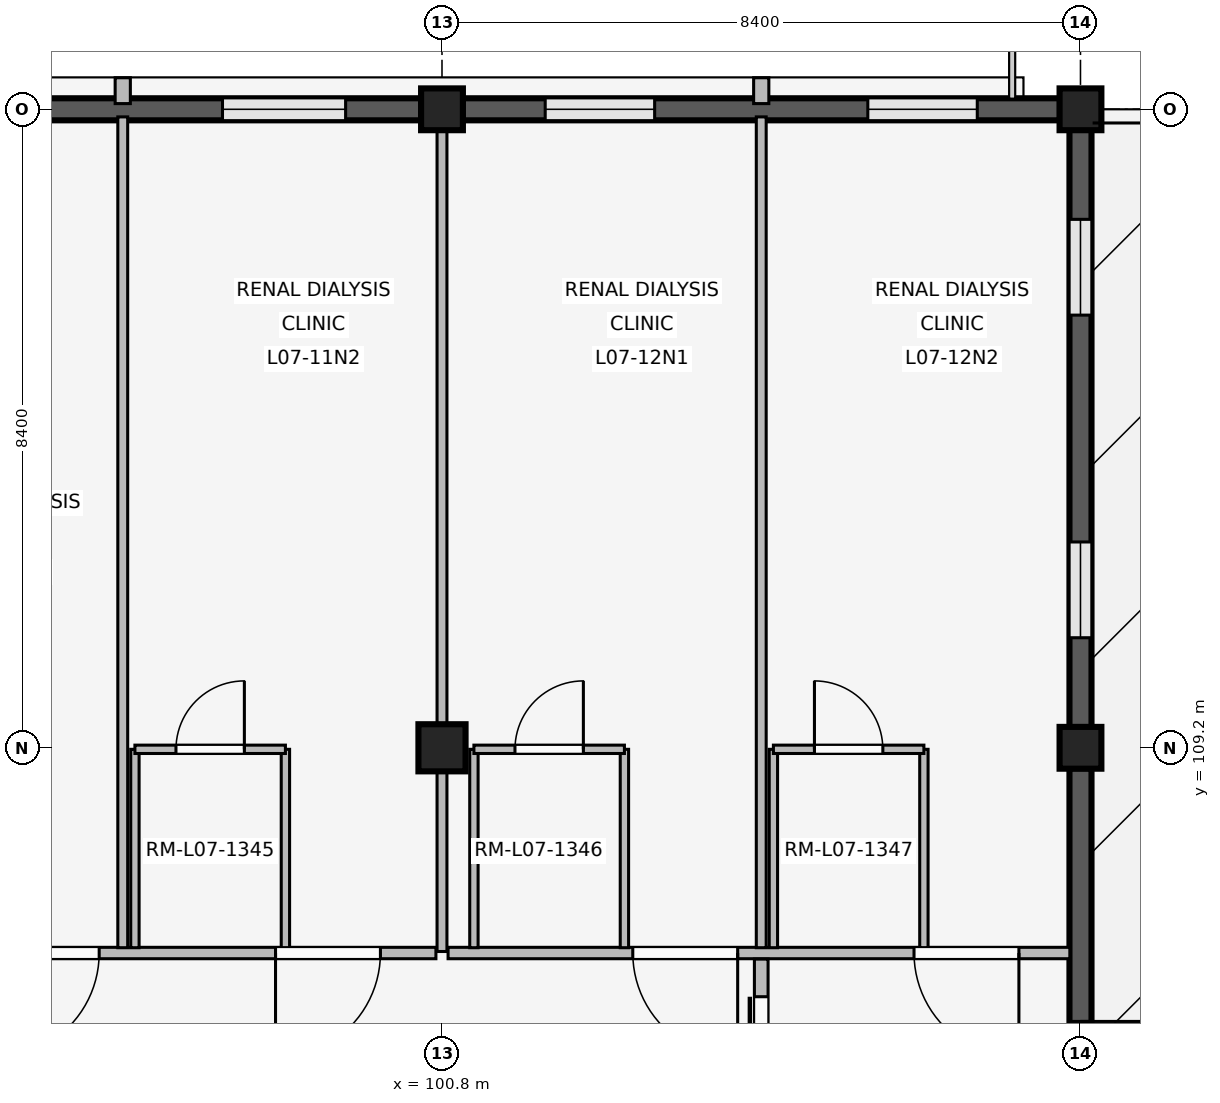
"""IFC4 building model, lengths in metres.
Left out: names, types, materials, properties, quantities, classifications, styles, units other than length and angle.
Written with IfcOpenShell. Run it as: python <this file> out.ifc"""

import sys

from ifc_helpers import new_model, si_unit, direction, frame, frame_2d, origin, origin_2d, place, context, subcontext, project, spatial, rectangle, extrude, element, fill, save


model = new_model("IFC4")
c1 = context("Model", 3, precision=1e-05, world=origin(), true_north=direction((0.0, 1.0)))
c2 = subcontext(c1, "Body", "Model", "MODEL_VIEW")
j1 = project(units=[si_unit("LENGTHUNIT", "METRE"), si_unit("PLANEANGLEUNIT", "RADIAN")], contexts=[c1])
p1 = place(None, origin())
s1 = spatial("IfcSite", under=j1, at=p1, CompositionType="ELEMENT")
p2 = place(p1, origin())
s2 = spatial("IfcBuilding", under=s1, at=p2, CompositionType="ELEMENT")
p3 = place(p2, frame((0.0, 0.0, 28.8)))
s3 = spatial("IfcBuildingStorey", under=s2, at=p3, CompositionType="ELEMENT", Elevation=28.8)
p4 = place(p3, frame((100.8, 109.2, 0.0), z_axis=(0.0, 0.0, 1.0), x_axis=(1.0, 0.0, 0.0)))
e1 = element("IfcColumn", 1, at=p4, inside=s3, PredefinedType="COLUMN", context=c2, shape_type="SweptSolid", body=[
    extrude(rectangle(XDim=0.62, YDim=0.62, at=origin_2d()), origin(), (0.0, 0.0, 1.0), 4.2),
])
for number, where, z_axis, x_axis in (
    (2, (100.8, 117.6, 0.0), (0.0, 0.0, 1.0), (1.0, 0.0, 0.0)),
    (3, (109.2, 109.2, 0.0), (0.0, 0.0, 1.0), (1.0, 0.0, 0.0)),
    (4, (109.2, 117.6, 0.0), (0.0, 0.0, 1.0), (1.0, 0.0, 0.0)),
):
    element("IfcColumn", number, at=place(p3, frame(where, z_axis=z_axis, x_axis=x_axis)), inside=s3, PredefinedType="COLUMN", context=c2, shape_type="SweptSolid", body=[
        extrude(rectangle(XDim=0.55, YDim=0.55, at=origin_2d()), origin(), (0.0, 0.0, 1.0), 4.2),
    ])
p5 = place(p3, frame((92.67, 117.6, 0.0), z_axis=(0.0, 0.0, 1.0), x_axis=(1.0, 0.0, 0.0)))
e5 = element("IfcWall", 5, at=p5, inside=s3, PredefinedType="SOLIDWALL", context=c2, shape_type="SweptSolid", body=[
    extrude(rectangle(XDim=7.86, YDim=0.29, at=frame_2d((3.93, 0.0))), origin(), (0.0, 0.0, 1.0), 3.34),
])
p6 = place(p5, frame((0.998, 0.0, 0.85)))
e6 = element("IfcOpeningElement", 6, at=p6, cuts=e5, PredefinedType="OPENING", context=c2, shape_type="SweptSolid", body=[
    extrude(rectangle(XDim=1.62, YDim=1.8, at=frame_2d((0.81, 0.9))), frame((0.0, 0.155, 0.0), z_axis=(0.0, -1.0, 0.0), x_axis=(1.0, 0.0, 0.0)), (0.0, 0.0, 1.0), 0.31),
])
p7 = place(p5, frame((5.242, 0.0, 0.85)))
e7 = element("IfcOpeningElement", 7, at=p7, cuts=e5, PredefinedType="OPENING", context=c2, shape_type="SweptSolid", body=[
    extrude(rectangle(XDim=1.62, YDim=1.8, at=frame_2d((0.81, 0.9))), frame((0.0, 0.155, 0.0), z_axis=(0.0, -1.0, 0.0), x_axis=(1.0, 0.0, 0.0)), (0.0, 0.0, 1.0), 0.31),
])
p8 = place(p3, frame((96.6, 117.675, 0.0), z_axis=(0.0, 0.0, 1.0), x_axis=(0.0, 1.0, 0.0)))
e8 = element("IfcWall", 8, at=p8, inside=s3, PredefinedType="ELEMENTEDWALL", context=c2, shape_type="SweptSolid", body=[
    extrude(rectangle(XDim=0.34, YDim=0.2, at=frame_2d((0.17, 0.0))), origin(), (0.0, 0.0, 1.0), 3.32),
])
p9 = place(p3, frame((109.2, 108.93, 0.0), z_axis=(0.0, 0.0, 1.0), x_axis=(0.0, -1.0, 0.0)))
e9 = element("IfcWall", 9, at=p9, inside=s3, PredefinedType="SOLIDWALL", context=c2, shape_type="SweptSolid", body=[
    extrude(rectangle(XDim=7.86, YDim=0.29, at=frame_2d((3.93, 0.0))), origin(), (0.0, 0.0, 1.0), 3.34),
])
p10 = place(p9, frame((3.33, 0.0, 0.0)))
e10 = element("IfcOpeningElement", 10, at=p10, cuts=e9, PredefinedType="OPENING", context=c2, shape_type="SweptSolid", body=[
    extrude(rectangle(XDim=1.2, YDim=2.25, at=frame_2d((0.6, 1.125))), frame((0.0, 0.155, 0.0), z_axis=(0.0, -1.0, 0.0), x_axis=(1.0, 0.0, 0.0)), (0.0, 0.0, 1.0), 0.31),
])
p11 = place(p3, frame((101.07, 117.6, 0.0), z_axis=(0.0, 0.0, 1.0), x_axis=(1.0, 0.0, 0.0)))
e11 = element("IfcWall", 11, at=p11, inside=s3, PredefinedType="SOLIDWALL", context=c2, shape_type="SweptSolid", body=[
    extrude(rectangle(XDim=7.86, YDim=0.29, at=frame_2d((3.93, 0.0))), origin(), (0.0, 0.0, 1.0), 3.34),
])
p12 = place(p11, frame((1.088, 0.0, 0.85)))
e12 = element("IfcOpeningElement", 12, at=p12, cuts=e11, PredefinedType="OPENING", context=c2, shape_type="SweptSolid", body=[
    extrude(rectangle(XDim=1.44, YDim=1.62, at=frame_2d((0.72, 0.81))), frame((0.0, 0.155, 0.0), z_axis=(0.0, -1.0, 0.0), x_axis=(1.0, 0.0, 0.0)), (0.0, 0.0, 1.0), 0.31),
])
p13 = place(p11, frame((5.332, 0.0, 0.85)))
e13 = element("IfcOpeningElement", 13, at=p13, cuts=e11, PredefinedType="OPENING", context=c2, shape_type="SweptSolid", body=[
    extrude(rectangle(XDim=1.44, YDim=1.62, at=frame_2d((0.72, 0.81))), frame((0.0, 0.155, 0.0), z_axis=(0.0, -1.0, 0.0), x_axis=(1.0, 0.0, 0.0)), (0.0, 0.0, 1.0), 0.31),
])
p14 = place(p3, frame((105.0, 117.675, 0.0), z_axis=(0.0, 0.0, 1.0), x_axis=(0.0, 1.0, 0.0)))
e14 = element("IfcWall", 14, at=p14, inside=s3, PredefinedType="ELEMENTEDWALL", context=c2, shape_type="SweptSolid", body=[
    extrude(rectangle(XDim=0.34, YDim=0.2, at=frame_2d((0.17, 0.0))), origin(), (0.0, 0.0, 1.0), 3.32),
])
p15 = place(p3, frame((109.2, 117.33, 0.0), z_axis=(0.0, 0.0, 1.0), x_axis=(0.0, -1.0, 0.0)))
e15 = element("IfcWall", 15, at=p15, inside=s3, PredefinedType="SOLIDWALL", context=c2, shape_type="SweptSolid", body=[
    extrude(rectangle(XDim=7.86, YDim=0.29, at=frame_2d((3.93, 0.0))), origin(), (0.0, 0.0, 1.0), 3.34),
])
p16 = place(p15, frame((1.178, 0.0, 0.85)))
e16 = element("IfcOpeningElement", 16, at=p16, cuts=e15, PredefinedType="OPENING", context=c2, shape_type="SweptSolid", body=[
    extrude(rectangle(XDim=1.26, YDim=1.52, at=frame_2d((0.63, 0.76))), frame((0.0, 0.155, 0.0), z_axis=(0.0, -1.0, 0.0), x_axis=(1.0, 0.0, 0.0)), (0.0, 0.0, 1.0), 0.31),
])
p17 = place(p15, frame((5.422, 0.0, 0.85)))
e17 = element("IfcOpeningElement", 17, at=p17, cuts=e15, PredefinedType="OPENING", context=c2, shape_type="SweptSolid", body=[
    extrude(rectangle(XDim=1.26, YDim=1.52, at=frame_2d((0.63, 0.76))), frame((0.0, 0.155, 0.0), z_axis=(0.0, -1.0, 0.0), x_axis=(1.0, 0.0, 0.0)), (0.0, 0.0, 1.0), 0.31),
])
p18 = place(p3, frame((100.72, 106.5, 0.0), z_axis=(0.0, 0.0, 1.0), x_axis=(-1.0, 0.0, 0.0)))
e18 = element("IfcWall", 18, at=p18, inside=s3, PredefinedType="PARTITIONING", context=c2, shape_type="SweptSolid", body=[
    extrude(rectangle(XDim=7.96, YDim=0.15, at=frame_2d((3.98, 0.0))), origin(), (0.0, 0.0, 1.0), 3.32),
])
p19 = place(p18, frame((0.73, 0.0, 0.0)))
e19 = element("IfcOpeningElement", 19, at=p19, cuts=e18, PredefinedType="OPENING", context=c2, shape_type="SweptSolid", body=[
    extrude(rectangle(XDim=1.38, YDim=2.25, at=frame_2d((0.69, 1.125))), frame((0.0, 0.085, 0.0), z_axis=(0.0, -1.0, 0.0), x_axis=(1.0, 0.0, 0.0)), (0.0, 0.0, 1.0), 0.17),
])
p20 = place(p18, frame((4.43, 0.0, 0.0)))
e20 = element("IfcOpeningElement", 20, at=p20, cuts=e18, PredefinedType="OPENING", context=c2, shape_type="SweptSolid", body=[
    extrude(rectangle(XDim=1.38, YDim=2.25, at=frame_2d((0.69, 1.125))), frame((0.0, 0.085, 0.0), z_axis=(0.0, -1.0, 0.0), x_axis=(1.0, 0.0, 0.0)), (0.0, 0.0, 1.0), 0.17),
])
p21 = place(p3, frame((96.6, 106.57, 0.0), z_axis=(0.0, 0.0, 1.0), x_axis=(0.0, 1.0, 0.0)))
e21 = element("IfcWall", 21, at=p21, inside=s3, PredefinedType="PARTITIONING", context=c2, shape_type="SweptSolid", body=[
    extrude(rectangle(XDim=10.93, YDim=0.13, at=frame_2d((5.465, 0.0))), origin(), (0.0, 0.0, 1.0), 3.32),
])
for number, where, z_axis, x_axis in (
    (22, (96.76, 106.57, 0.0), (0.0, 0.0, 1.0), (0.0, 1.0, 0.0)),
    (23, (98.74, 106.57, 0.0), (0.0, 0.0, 1.0), (0.0, 1.0, 0.0)),
):
    element("IfcWall", number, at=place(p3, frame(where, z_axis=z_axis, x_axis=x_axis)), inside=s3, PredefinedType="PARTITIONING", context=c2, shape_type="SweptSolid", body=[
        extrude(rectangle(XDim=2.61, YDim=0.11, at=frame_2d((1.305, 0.0))), origin(), (0.0, 0.0, 1.0), 3.32),
    ])
p22 = place(p3, frame((96.76, 109.18, 0.0), z_axis=(0.0, 0.0, 1.0), x_axis=(1.0, 0.0, 0.0)))
e24 = element("IfcWall", 24, at=p22, inside=s3, PredefinedType="PARTITIONING", context=c2, shape_type="SweptSolid", body=[
    extrude(rectangle(XDim=1.98, YDim=0.11, at=frame_2d((0.99, 0.0))), origin(), (0.0, 0.0, 1.0), 3.32),
])
p23 = place(p22, frame((0.54, 0.0, 0.0)))
e25 = element("IfcOpeningElement", 25, at=p23, cuts=e24, PredefinedType="OPENING", context=c2, shape_type="SweptSolid", body=[
    extrude(rectangle(XDim=0.9, YDim=2.1, at=frame_2d((0.45, 1.05))), frame((0.0, 0.065, 0.0), z_axis=(0.0, -1.0, 0.0), x_axis=(1.0, 0.0, 0.0)), (0.0, 0.0, 1.0), 0.13),
])
p24 = place(p3, frame((100.8, 106.52, 0.0), z_axis=(0.0, 0.0, 1.0), x_axis=(0.0, 1.0, 0.0)))
e26 = element("IfcWall", 26, at=p24, inside=s3, PredefinedType="PARTITIONING", context=c2, shape_type="SweptSolid", body=[
    extrude(rectangle(XDim=10.94, YDim=0.13, at=frame_2d((5.47, 0.0))), origin(), (0.0, 0.0, 1.0), 3.32),
])
p25 = place(p3, frame((109.06, 106.5, 0.0), z_axis=(0.0, 0.0, 1.0), x_axis=(-1.0, 0.0, 0.0)))
e27 = element("IfcWall", 27, at=p25, inside=s3, PredefinedType="PARTITIONING", context=c2, shape_type="SweptSolid", body=[
    extrude(rectangle(XDim=8.18, YDim=0.15, at=frame_2d((4.09, 0.0))), origin(), (0.0, 0.0, 1.0), 3.32),
])
p26 = place(p25, frame((0.67, 0.0, 0.0)))
e28 = element("IfcOpeningElement", 28, at=p26, cuts=e27, PredefinedType="OPENING", context=c2, shape_type="SweptSolid", body=[
    extrude(rectangle(XDim=1.38, YDim=2.25, at=frame_2d((0.69, 1.125))), frame((0.0, 0.085, 0.0), z_axis=(0.0, -1.0, 0.0), x_axis=(1.0, 0.0, 0.0)), (0.0, 0.0, 1.0), 0.17),
])
p27 = place(p25, frame((4.37, 0.0, 0.0)))
e29 = element("IfcOpeningElement", 29, at=p27, cuts=e27, PredefinedType="OPENING", context=c2, shape_type="SweptSolid", body=[
    extrude(rectangle(XDim=1.38, YDim=2.25, at=frame_2d((0.69, 1.125))), frame((0.0, 0.085, 0.0), z_axis=(0.0, -1.0, 0.0), x_axis=(1.0, 0.0, 0.0)), (0.0, 0.0, 1.0), 0.17),
])
p28 = place(p3, frame((105.0, 106.57, 0.0), z_axis=(0.0, 0.0, 1.0), x_axis=(0.0, 1.0, 0.0)))
e30 = element("IfcWall", 30, at=p28, inside=s3, PredefinedType="PARTITIONING", context=c2, shape_type="SweptSolid", body=[
    extrude(rectangle(XDim=10.93, YDim=0.13, at=frame_2d((5.465, 0.0))), origin(), (0.0, 0.0, 1.0), 3.32),
])
for number, where, z_axis, x_axis in (
    (31, (101.22, 106.57, 0.0), (0.0, 0.0, 1.0), (0.0, 1.0, 0.0)),
    (32, (103.2, 106.57, 0.0), (0.0, 0.0, 1.0), (0.0, 1.0, 0.0)),
):
    element("IfcWall", number, at=place(p3, frame(where, z_axis=z_axis, x_axis=x_axis)), inside=s3, PredefinedType="PARTITIONING", context=c2, shape_type="SweptSolid", body=[
        extrude(rectangle(XDim=2.61, YDim=0.11, at=frame_2d((1.305, 0.0))), origin(), (0.0, 0.0, 1.0), 3.32),
    ])
p29 = place(p3, frame((101.22, 109.18, 0.0), z_axis=(0.0, 0.0, 1.0), x_axis=(1.0, 0.0, 0.0)))
e33 = element("IfcWall", 33, at=p29, inside=s3, PredefinedType="PARTITIONING", context=c2, shape_type="SweptSolid", body=[
    extrude(rectangle(XDim=1.98, YDim=0.11, at=frame_2d((0.99, 0.0))), origin(), (0.0, 0.0, 1.0), 3.32),
])
p30 = place(p29, frame((0.54, 0.0, 0.0)))
e34 = element("IfcOpeningElement", 34, at=p30, cuts=e33, PredefinedType="OPENING", context=c2, shape_type="SweptSolid", body=[
    extrude(rectangle(XDim=0.9, YDim=2.1, at=frame_2d((0.45, 1.05))), frame((0.0, 0.065, 0.0), z_axis=(0.0, -1.0, 0.0), x_axis=(1.0, 0.0, 0.0)), (0.0, 0.0, 1.0), 0.13),
])
for number, where, z_axis, x_axis in (
    (35, (105.16, 106.57, 0.0), (0.0, 0.0, 1.0), (0.0, 1.0, 0.0)),
    (36, (107.14, 106.57, 0.0), (0.0, 0.0, 1.0), (0.0, 1.0, 0.0)),
):
    element("IfcWall", number, at=place(p3, frame(where, z_axis=z_axis, x_axis=x_axis)), inside=s3, PredefinedType="PARTITIONING", context=c2, shape_type="SweptSolid", body=[
        extrude(rectangle(XDim=2.61, YDim=0.11, at=frame_2d((1.305, 0.0))), origin(), (0.0, 0.0, 1.0), 3.32),
    ])
p31 = place(p3, frame((105.16, 109.18, 0.0), z_axis=(0.0, 0.0, 1.0), x_axis=(1.0, 0.0, 0.0)))
e37 = element("IfcWall", 37, at=p31, inside=s3, PredefinedType="PARTITIONING", context=c2, shape_type="SweptSolid", body=[
    extrude(rectangle(XDim=1.98, YDim=0.11, at=frame_2d((0.99, 0.0))), origin(), (0.0, 0.0, 1.0), 3.32),
])
p32 = place(p31, frame((0.54, 0.0, 0.0)))
e38 = element("IfcOpeningElement", 38, at=p32, cuts=e37, PredefinedType="OPENING", context=c2, shape_type="SweptSolid", body=[
    extrude(rectangle(XDim=0.9, YDim=2.1, at=frame_2d((0.45, 1.05))), frame((0.0, 0.065, 0.0), z_axis=(0.0, -1.0, 0.0), x_axis=(1.0, 0.0, 0.0)), (0.0, 0.0, 1.0), 0.13),
])
p33 = place(p3, frame((105.0, 103.58, 0.0), z_axis=(0.0, 0.0, 1.0), x_axis=(0.0, 1.0, 0.0)))
e39 = element("IfcWall", 39, at=p33, inside=s3, PredefinedType="PARTITIONING", context=c2, shape_type="SweptSolid", body=[
    extrude(rectangle(XDim=2.84, YDim=0.18, at=frame_2d((1.42, 0.0))), origin(), (0.0, 0.0, 1.0), 3.32),
])
p34 = place(p33, frame((0.495, 0.0, 0.0)))
e40 = element("IfcOpeningElement", 40, at=p34, cuts=e39, PredefinedType="OPENING", context=c2, shape_type="SweptSolid", body=[
    extrude(rectangle(XDim=1.85, YDim=2.3, at=frame_2d((0.925, 1.15))), frame((0.0, 0.1, 0.0), z_axis=(0.0, -1.0, 0.0), x_axis=(1.0, 0.0, 0.0)), (0.0, 0.0, 1.0), 0.2),
])
p35 = place(p7, origin())
e41 = element("IfcWindow", 41, at=p35, inside=s3, PartitioningType="SINGLE_PANEL", PredefinedType="WINDOW", context=c2, shape_type="SweptSolid", body=[
    extrude(rectangle(XDim=1.62, YDim=1.8, at=frame_2d((0.81, 0.9))), frame((0.0, 0.03, 0.0), z_axis=(0.0, -1.0, 0.0), x_axis=(1.0, 0.0, 0.0)), (0.0, 0.0, 1.0), 0.06),
])
fill(e7, e41)
p36 = place(p10, origin())
e42 = element("IfcDoor", 42, at=p36, inside=s3, OperationType="SINGLE_SWING_LEFT", PredefinedType="DOOR", context=c2, shape_type="SweptSolid", body=[
    extrude(rectangle(XDim=1.2, YDim=2.25, at=frame_2d((0.6, 1.125))), frame((0.0, 0.025, 0.0), z_axis=(0.0, -1.0, 0.0), x_axis=(1.0, 0.0, 0.0)), (0.0, 0.0, 1.0), 0.05),
])
fill(e10, e42)
p37 = place(p12, origin())
e43 = element("IfcWindow", 43, at=p37, inside=s3, PartitioningType="SINGLE_PANEL", PredefinedType="WINDOW", context=c2, shape_type="SweptSolid", body=[
    extrude(rectangle(XDim=1.44, YDim=1.62, at=frame_2d((0.72, 0.81))), frame((0.0, 0.03, 0.0), z_axis=(0.0, -1.0, 0.0), x_axis=(1.0, 0.0, 0.0)), (0.0, 0.0, 1.0), 0.06),
])
fill(e12, e43)
p38 = place(p13, origin())
e44 = element("IfcWindow", 44, at=p38, inside=s3, PartitioningType="SINGLE_PANEL", PredefinedType="WINDOW", context=c2, shape_type="SweptSolid", body=[
    extrude(rectangle(XDim=1.44, YDim=1.62, at=frame_2d((0.72, 0.81))), frame((0.0, 0.03, 0.0), z_axis=(0.0, -1.0, 0.0), x_axis=(1.0, 0.0, 0.0)), (0.0, 0.0, 1.0), 0.06),
])
fill(e13, e44)
p39 = place(p16, origin())
e45 = element("IfcWindow", 45, at=p39, inside=s3, PartitioningType="SINGLE_PANEL", PredefinedType="WINDOW", context=c2, shape_type="SweptSolid", body=[
    extrude(rectangle(XDim=1.26, YDim=1.52, at=frame_2d((0.63, 0.76))), frame((0.0, 0.03, 0.0), z_axis=(0.0, -1.0, 0.0), x_axis=(1.0, 0.0, 0.0)), (0.0, 0.0, 1.0), 0.06),
])
fill(e16, e45)
p40 = place(p17, origin())
e46 = element("IfcWindow", 46, at=p40, inside=s3, PartitioningType="SINGLE_PANEL", PredefinedType="WINDOW", context=c2, shape_type="SweptSolid", body=[
    extrude(rectangle(XDim=1.26, YDim=1.52, at=frame_2d((0.63, 0.76))), frame((0.0, 0.03, 0.0), z_axis=(0.0, -1.0, 0.0), x_axis=(1.0, 0.0, 0.0)), (0.0, 0.0, 1.0), 0.06),
])
fill(e17, e46)
p41 = place(p19, origin())
e47 = element("IfcDoor", 47, at=p41, inside=s3, OperationType="SINGLE_SWING_RIGHT", PredefinedType="DOOR", context=c2, shape_type="SweptSolid", body=[
    extrude(rectangle(XDim=1.38, YDim=2.25, at=frame_2d((0.69, 1.125))), frame((0.0, 0.025, 0.0), z_axis=(0.0, -1.0, 0.0), x_axis=(1.0, 0.0, 0.0)), (0.0, 0.0, 1.0), 0.05),
])
fill(e19, e47)
p42 = place(p20, origin())
e48 = element("IfcDoor", 48, at=p42, inside=s3, OperationType="SINGLE_SWING_RIGHT", PredefinedType="DOOR", context=c2, shape_type="SweptSolid", body=[
    extrude(rectangle(XDim=1.38, YDim=2.25, at=frame_2d((0.69, 1.125))), frame((0.0, 0.025, 0.0), z_axis=(0.0, -1.0, 0.0), x_axis=(1.0, 0.0, 0.0)), (0.0, 0.0, 1.0), 0.05),
])
fill(e20, e48)
p43 = place(p23, origin())
e49 = element("IfcDoor", 49, at=p43, inside=s3, OperationType="SINGLE_SWING_RIGHT", PredefinedType="DOOR", context=c2, shape_type="SweptSolid", body=[
    extrude(rectangle(XDim=0.9, YDim=2.1, at=frame_2d((0.45, 1.05))), frame((0.0, 0.025, 0.0), z_axis=(0.0, -1.0, 0.0), x_axis=(1.0, 0.0, 0.0)), (0.0, 0.0, 1.0), 0.05),
])
fill(e25, e49)
p44 = place(p26, origin())
e50 = element("IfcDoor", 50, at=p44, inside=s3, OperationType="SINGLE_SWING_LEFT", PredefinedType="DOOR", context=c2, shape_type="SweptSolid", body=[
    extrude(rectangle(XDim=1.38, YDim=2.25, at=frame_2d((0.69, 1.125))), frame((0.0, 0.025, 0.0), z_axis=(0.0, -1.0, 0.0), x_axis=(1.0, 0.0, 0.0)), (0.0, 0.0, 1.0), 0.05),
])
fill(e28, e50)
p45 = place(p27, origin())
e51 = element("IfcDoor", 51, at=p45, inside=s3, OperationType="SINGLE_SWING_LEFT", PredefinedType="DOOR", context=c2, shape_type="SweptSolid", body=[
    extrude(rectangle(XDim=1.38, YDim=2.25, at=frame_2d((0.69, 1.125))), frame((0.0, 0.025, 0.0), z_axis=(0.0, -1.0, 0.0), x_axis=(1.0, 0.0, 0.0)), (0.0, 0.0, 1.0), 0.05),
])
fill(e29, e51)
p46 = place(p30, origin())
e52 = element("IfcDoor", 52, at=p46, inside=s3, OperationType="SINGLE_SWING_RIGHT", PredefinedType="DOOR", context=c2, shape_type="SweptSolid", body=[
    extrude(rectangle(XDim=0.9, YDim=2.1, at=frame_2d((0.45, 1.05))), frame((0.0, 0.025, 0.0), z_axis=(0.0, -1.0, 0.0), x_axis=(1.0, 0.0, 0.0)), (0.0, 0.0, 1.0), 0.05),
])
fill(e34, e52)
p47 = place(p32, origin())
e53 = element("IfcDoor", 53, at=p47, inside=s3, OperationType="SINGLE_SWING_LEFT", PredefinedType="DOOR", context=c2, shape_type="SweptSolid", body=[
    extrude(rectangle(XDim=0.9, YDim=2.1, at=frame_2d((0.45, 1.05))), frame((0.0, 0.025, 0.0), z_axis=(0.0, -1.0, 0.0), x_axis=(1.0, 0.0, 0.0)), (0.0, 0.0, 1.0), 0.05),
])
fill(e38, e53)
p48 = place(p34, origin())
e54 = element("IfcDoor", 54, at=p48, inside=s3, OperationType="SLIDING_TO_LEFT", PredefinedType="DOOR", context=c2, shape_type="SweptSolid", body=[
    extrude(rectangle(XDim=1.85, YDim=2.3, at=frame_2d((0.925, 1.15))), frame((0.0, 0.025, 0.0), z_axis=(0.0, -1.0, 0.0), x_axis=(1.0, 0.0, 0.0)), (0.0, 0.0, 1.0), 0.05),
])
fill(e40, e54)
save(model, sys.argv[1])
